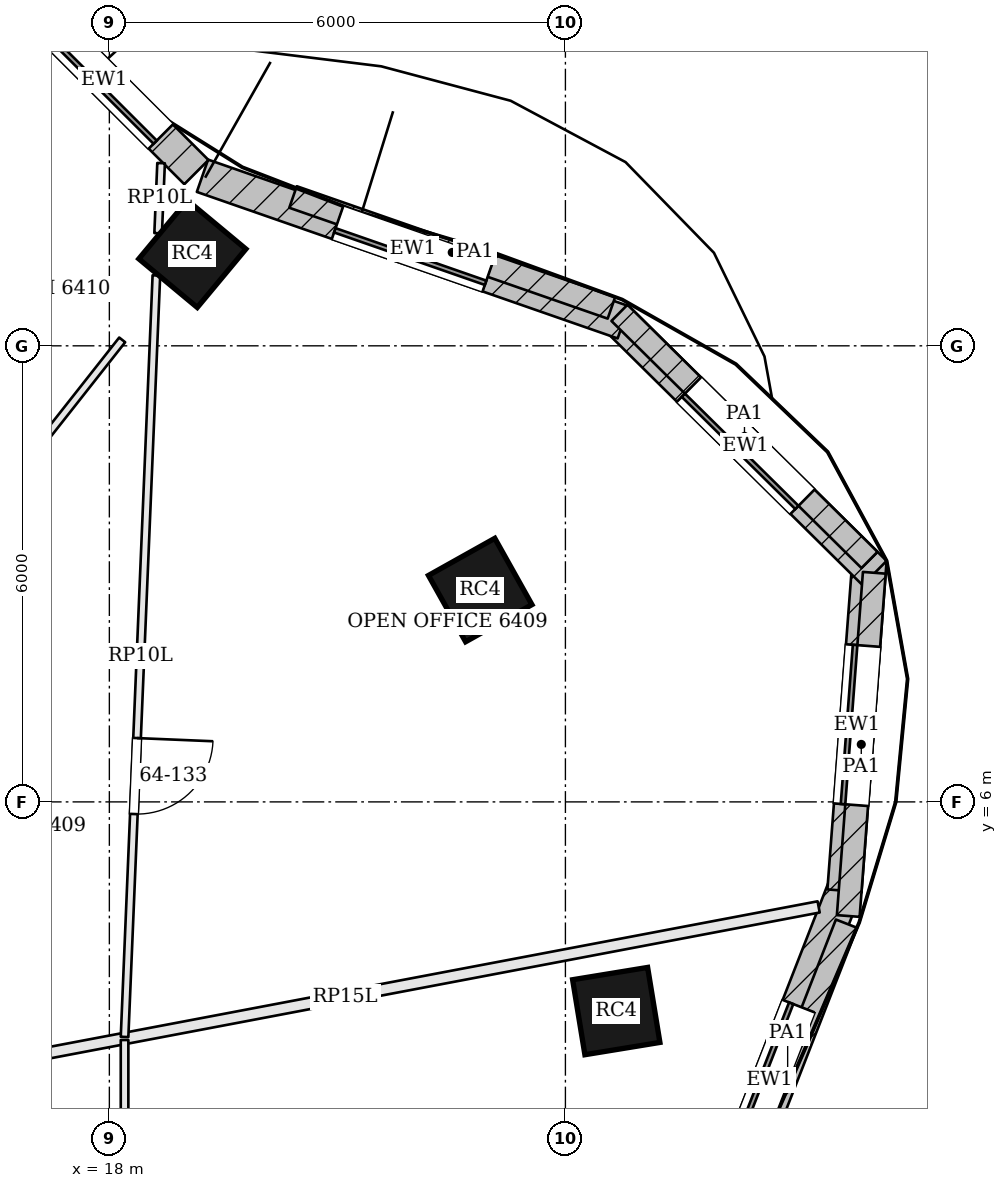
"""IFC4 building model, lengths in metres.
Left out: names, types, materials, properties, quantities, classifications, styles, units other than length and angle.
Written with IfcOpenShell. Run it as: python <this file> out.ifc"""

import sys

from ifc_helpers import new_model, si_unit, direction, frame, frame_2d, origin, origin_2d, place, context, subcontext, project, spatial, rectangle, extrude, element, fill, save


model = new_model("IFC4")
c1 = context("Model", 3, precision=1e-05, world=origin(), true_north=direction((0.0, 1.0)))
c2 = subcontext(c1, "Body", "Model", "MODEL_VIEW")
j1 = project(units=[si_unit("LENGTHUNIT", "METRE"), si_unit("PLANEANGLEUNIT", "RADIAN")], contexts=[c1])
p1 = place(None, origin())
s1 = spatial("IfcSite", under=j1, at=p1, CompositionType="ELEMENT")
p2 = place(p1, origin())
s2 = spatial("IfcBuilding", under=s1, at=p2, CompositionType="ELEMENT")
p3 = place(p2, frame((0.0, 0.0, 260.4)))
s3 = spatial("IfcBuildingStorey", under=s2, at=p3, CompositionType="ELEMENT", Elevation=260.4)
for number, where, z_axis, x_axis in (
    (1, (24.669, 3.248, 0.0), (0.0, 0.0, 1.0), (-0.162, 0.987, 0.0)),
    (2, (22.879, 8.787, 0.0), (0.0, 0.0, 1.0), (-0.489, 0.873, 0.0)),
    (3, (19.092, 13.209, 0.0), (0.0, 0.0, 1.0), (-0.769, 0.639, 0.0)),
):
    element("IfcColumn", number, at=place(p3, frame(where, z_axis=z_axis, x_axis=x_axis)), inside=s3, PredefinedType="COLUMN", context=c2, shape_type="SweptSolid", body=[
        extrude(rectangle(XDim=1.0, YDim=1.0, at=origin_2d()), origin(), (0.0, 0.0, 1.0), 3.1),
    ])
p4 = place(p3, frame((25.687, -0.226, 0.0), z_axis=(0.0, 0.0, 1.0), x_axis=(0.363500194409, 0.931594122279, 0.0)))
e4 = element("IfcWall", 4, at=p4, inside=s3, PredefinedType="SOLIDWALL", context=c2, shape_type="SweptSolid", body=[
    extrude(rectangle(XDim=5.499, YDim=0.45, at=frame_2d((2.75, 0.0))), origin(), (0.0, 0.0, 1.0), 3.6),
])
p5 = place(p4, frame((1.699, 0.0, 0.9)))
e5 = element("IfcOpeningElement", 5, at=p5, cuts=e4, PredefinedType="OPENING", context=c2, shape_type="SweptSolid", body=[
    extrude(rectangle(XDim=2.1, YDim=1.8, at=frame_2d((1.05, 0.9))), frame((0.0, 0.235, 0.0), z_axis=(0.0, -1.0, 0.0), x_axis=(1.0, 0.0, 0.0)), (0.0, 0.0, 1.0), 0.47),
])
p6 = place(p3, frame((27.671, 4.831, 0.0), z_axis=(0.0, 0.0, 1.0), x_axis=(0.075658122047, 0.997133816781, 0.0)))
e6 = element("IfcWall", 6, at=p6, inside=s3, PredefinedType="SOLIDWALL", context=c2, shape_type="SweptSolid", body=[
    extrude(rectangle(XDim=4.369, YDim=0.45, at=frame_2d((2.185, 0.0))), origin(), (0.0, 0.0, 1.0), 3.6),
])
p7 = place(p6, frame((1.135, 0.0, 0.9)))
e7 = element("IfcOpeningElement", 7, at=p7, cuts=e6, PredefinedType="OPENING", context=c2, shape_type="SweptSolid", body=[
    extrude(rectangle(XDim=2.1, YDim=1.8, at=frame_2d((1.05, 0.9))), frame((0.0, 0.235, 0.0), z_axis=(0.0, -1.0, 0.0), x_axis=(1.0, 0.0, 0.0)), (0.0, 0.0, 1.0), 0.47),
])
p8 = place(p3, frame((28.068, 9.011, 0.0), z_axis=(0.0, 0.0, 1.0), x_axis=(-0.711293453435, 0.702895172199, 0.0)))
e8 = element("IfcWall", 8, at=p8, inside=s3, PredefinedType="SOLIDWALL", context=c2, shape_type="SweptSolid", body=[
    extrude(rectangle(XDim=4.768, YDim=0.45, at=frame_2d((2.384, 0.0))), origin(), (0.0, 0.0, 1.0), 3.6),
])
p9 = place(p8, frame((1.334, 0.0, 0.9)))
e9 = element("IfcOpeningElement", 9, at=p9, cuts=e8, PredefinedType="OPENING", context=c2, shape_type="SweptSolid", body=[
    extrude(rectangle(XDim=2.1, YDim=1.8, at=frame_2d((1.05, 0.9))), frame((0.0, 0.235, 0.0), z_axis=(0.0, -1.0, 0.0), x_axis=(1.0, 0.0, 0.0)), (0.0, 0.0, 1.0), 0.47),
])
p10 = place(p3, frame((24.761, 12.31, 0.0), z_axis=(0.0, 0.0, 1.0), x_axis=(-0.944397305248, 0.328806523414, 0.0)))
e10 = element("IfcWall", 10, at=p10, inside=s3, PredefinedType="SOLIDWALL", context=c2, shape_type="SweptSolid", body=[
    extrude(rectangle(XDim=5.862, YDim=0.45, at=frame_2d((2.931, 0.0))), origin(), (0.0, 0.0, 1.0), 3.6),
])
p11 = place(p10, frame((1.881, 0.0, 0.9)))
e11 = element("IfcOpeningElement", 11, at=p11, cuts=e10, PredefinedType="OPENING", context=c2, shape_type="SweptSolid", body=[
    extrude(rectangle(XDim=2.1, YDim=1.8, at=frame_2d((1.05, 0.9))), frame((0.0, 0.235, 0.0), z_axis=(0.0, -1.0, 0.0), x_axis=(1.0, 0.0, 0.0)), (0.0, 0.0, 1.0), 0.47),
])
p12 = place(p3, frame((19.145, 14.285, 0.0), z_axis=(0.0, 0.0, 1.0), x_axis=(-0.707427521052, 0.706785895769, 0.0)))
e12 = element("IfcWall", 12, at=p12, inside=s3, PredefinedType="SOLIDWALL", context=c2, shape_type="SweptSolid", body=[
    extrude(rectangle(XDim=3.425, YDim=0.45, at=frame_2d((1.712, 0.0))), origin(), (0.0, 0.0, 1.0), 3.6),
])
p13 = place(p12, frame((0.662, 0.0, 0.9)))
e13 = element("IfcOpeningElement", 13, at=p13, cuts=e12, PredefinedType="OPENING", context=c2, shape_type="SweptSolid", body=[
    extrude(rectangle(XDim=2.1, YDim=1.8, at=frame_2d((1.05, 0.9))), frame((0.0, 0.235, 0.0), z_axis=(0.0, -1.0, 0.0), x_axis=(1.0, 0.0, 0.0)), (0.0, 0.0, 1.0), 0.47),
])
p14 = place(p3, frame((26.15, 0.429, 3.9), z_axis=(0.0, 0.0, 1.0), x_axis=(0.36347212441, 0.931605074469, 0.0)))
e14 = element("IfcWall", 14, at=p14, inside=s3, PredefinedType="PARAPET", context=c2, shape_type="SweptSolid", body=[
    extrude(rectangle(XDim=4.26, YDim=0.3, at=frame_2d((2.13, 0.0))), origin(), (0.0, 0.0, 1.0), 1.1),
])
p15 = place(p3, frame((27.721, 4.499, 3.9), z_axis=(0.0, 0.0, 1.0), x_axis=(0.075645081273, 0.997134806172, 0.0)))
e15 = element("IfcWall", 15, at=p15, inside=s3, PredefinedType="PARAPET", context=c2, shape_type="SweptSolid", body=[
    extrude(rectangle(XDim=4.528, YDim=0.3, at=frame_2d((2.264, 0.0))), origin(), (0.0, 0.0, 1.0), 1.1),
])
p16 = place(p3, frame((28.0, 9.183, 3.9), z_axis=(0.0, 0.0, 1.0), x_axis=(-0.711291435321, 0.702897214419, 0.0)))
e16 = element("IfcWall", 16, at=p16, inside=s3, PredefinedType="PARAPET", context=c2, shape_type="SweptSolid", body=[
    extrude(rectangle(XDim=4.625, YDim=0.3, at=frame_2d((2.312, 0.0))), origin(), (0.0, 0.0, 1.0), 1.1),
])
p17 = place(p3, frame((24.605, 12.5, 3.9), z_axis=(0.0, 0.0, 1.0), x_axis=(-0.944388328268, 0.328832305943, 0.0)))
e17 = element("IfcWall", 17, at=p17, inside=s3, PredefinedType="PARAPET", context=c2, shape_type="SweptSolid", body=[
    extrude(rectangle(XDim=4.435, YDim=0.3, at=frame_2d((2.218, 0.0))), origin(), (0.0, 0.0, 1.0), 1.1),
])
p18 = place(p3, frame((17.811, 15.936, 3.9), z_axis=(0.0, 0.0, 1.0), x_axis=(-0.707385370732, 0.706828081837, 0.0)))
e18 = element("IfcWall", 18, at=p18, inside=s3, PredefinedType="PARAPET", context=c2, shape_type="SweptSolid", body=[
    extrude(rectangle(XDim=1.314, YDim=0.3, at=frame_2d((0.657, 0.0))), origin(), (0.0, 0.0, 1.0), 1.1),
])
p19 = place(p3, frame((27.332, 4.618, 0.0), z_axis=(0.0, 0.0, 1.0), x_axis=(-0.982506027703, -0.186230785661, 0.0)))
e19 = element("IfcWall", 19, at=p19, inside=s3, PredefinedType="PARTITIONING", context=c2, shape_type="SweptSolid", body=[
    extrude(rectangle(XDim=12.68, YDim=0.15, at=frame_2d((6.34, 0.0))), origin(), (0.0, 0.0, 1.0), 2.58),
])
p20 = place(p3, frame((18.2, 2.867, 0.0), z_axis=(0.0, 0.0, 1.0), x_axis=(0.0, -1.0, 0.0)))
e20 = element("IfcWall", 20, at=p20, inside=s3, PredefinedType="PARTITIONING", context=c2, shape_type="SweptSolid", body=[
    extrude(rectangle(XDim=11.067, YDim=0.1, at=frame_2d((5.534, 0.0))), origin(), (0.0, 0.0, 1.0), 2.984),
])
p21 = place(p20, frame((0.983, 0.0, 0.0)))
e21 = element("IfcOpeningElement", 21, at=p21, cuts=e20, PredefinedType="OPENING", context=c2, shape_type="SweptSolid", body=[
    extrude(rectangle(XDim=0.9, YDim=2.1, at=frame_2d((0.45, 1.05))), frame((0.0, 0.06, 0.0), z_axis=(0.0, -1.0, 0.0), x_axis=(1.0, 0.0, 0.0)), (0.0, 0.0, 1.0), 0.12),
])
p22 = place(p3, frame((18.681, 14.404, 0.0), z_axis=(0.0, 0.0, 1.0), x_axis=(-0.04178454469, -0.999126644538, 0.0)))
e22 = element("IfcWall", 22, at=p22, inside=s3, PredefinedType="PARTITIONING", context=c2, shape_type="SweptSolid", body=[
    extrude(rectangle(XDim=0.923, YDim=0.1, at=frame_2d((0.461, 0.0))), origin(), (0.0, 0.0, 1.0), 2.58),
])
p23 = place(p3, frame((18.619, 12.926, 0.0), z_axis=(0.0, 0.0, 1.0), x_axis=(-0.041781443757, -0.999126774217, 0.0)))
e23 = element("IfcWall", 23, at=p23, inside=s3, PredefinedType="PARTITIONING", context=c2, shape_type="SweptSolid", body=[
    extrude(rectangle(XDim=10.027, YDim=0.1, at=frame_2d((5.014, 0.0))), origin(), (0.0, 0.0, 1.0), 2.58),
])
p24 = place(p23, frame((6.092, 0.0, 0.0)))
e24 = element("IfcOpeningElement", 24, at=p24, cuts=e23, PredefinedType="OPENING", context=c2, shape_type="SweptSolid", body=[
    extrude(rectangle(XDim=1.0, YDim=2.1, at=frame_2d((0.5, 1.05))), frame((0.0, 0.06, 0.0), z_axis=(0.0, -1.0, 0.0), x_axis=(1.0, 0.0, 0.0)), (0.0, 0.0, 1.0), 0.12),
])
p25 = place(p3, frame((14.846, 7.863, 0.0), z_axis=(0.0, 0.0, 1.0), x_axis=(0.619070377388, 0.785335512912, 0.0)))
e25 = element("IfcWall", 25, at=p25, inside=s3, PredefinedType="PARTITIONING", context=c2, shape_type="SweptSolid", body=[
    extrude(rectangle(XDim=5.367, YDim=0.1, at=frame_2d((2.684, 0.0))), origin(), (0.0, 0.0, 1.0), 2.984),
])
p26 = place(p5, origin())
e26 = element("IfcWindow", 26, at=p26, inside=s3, PartitioningType="SINGLE_PANEL", PredefinedType="WINDOW", context=c2, shape_type="SweptSolid", body=[
    extrude(rectangle(XDim=2.1, YDim=1.8, at=frame_2d((1.05, 0.9))), frame((0.0, 0.135, 0.0), z_axis=(0.0, -1.0, 0.0), x_axis=(1.0, 0.0, 0.0)), (0.0, 0.0, 1.0), 0.06),
])
fill(e5, e26)
p27 = place(p7, origin())
e27 = element("IfcWindow", 27, at=p27, inside=s3, PartitioningType="SINGLE_PANEL", PredefinedType="WINDOW", context=c2, shape_type="SweptSolid", body=[
    extrude(rectangle(XDim=2.1, YDim=1.8, at=frame_2d((1.05, 0.9))), frame((0.0, 0.135, 0.0), z_axis=(0.0, -1.0, 0.0), x_axis=(1.0, 0.0, 0.0)), (0.0, 0.0, 1.0), 0.06),
])
fill(e7, e27)
p28 = place(p9, origin())
e28 = element("IfcWindow", 28, at=p28, inside=s3, PartitioningType="SINGLE_PANEL", PredefinedType="WINDOW", context=c2, shape_type="SweptSolid", body=[
    extrude(rectangle(XDim=2.1, YDim=1.8, at=frame_2d((1.05, 0.9))), frame((0.0, 0.135, 0.0), z_axis=(0.0, -1.0, 0.0), x_axis=(1.0, 0.0, 0.0)), (0.0, 0.0, 1.0), 0.06),
])
fill(e9, e28)
p29 = place(p11, origin())
e29 = element("IfcWindow", 29, at=p29, inside=s3, PartitioningType="SINGLE_PANEL", PredefinedType="WINDOW", context=c2, shape_type="SweptSolid", body=[
    extrude(rectangle(XDim=2.1, YDim=1.8, at=frame_2d((1.05, 0.9))), frame((0.0, 0.135, 0.0), z_axis=(0.0, -1.0, 0.0), x_axis=(1.0, 0.0, 0.0)), (0.0, 0.0, 1.0), 0.06),
])
fill(e11, e29)
p30 = place(p13, origin())
e30 = element("IfcWindow", 30, at=p30, inside=s3, PartitioningType="SINGLE_PANEL", PredefinedType="WINDOW", context=c2, shape_type="SweptSolid", body=[
    extrude(rectangle(XDim=2.1, YDim=1.8, at=frame_2d((1.05, 0.9))), frame((0.0, 0.135, 0.0), z_axis=(0.0, -1.0, 0.0), x_axis=(1.0, 0.0, 0.0)), (0.0, 0.0, 1.0), 0.06),
])
fill(e13, e30)
p31 = place(p24, origin())
e31 = element("IfcDoor", 31, at=p31, inside=s3, OperationType="SINGLE_SWING_LEFT", PredefinedType="DOOR", context=c2, shape_type="SweptSolid", body=[
    extrude(rectangle(XDim=1.0, YDim=2.1, at=frame_2d((0.5, 1.05))), frame((0.0, 0.025, 0.0), z_axis=(0.0, -1.0, 0.0), x_axis=(1.0, 0.0, 0.0)), (0.0, 0.0, 1.0), 0.05),
])
fill(e24, e31)
save(model, sys.argv[1])
